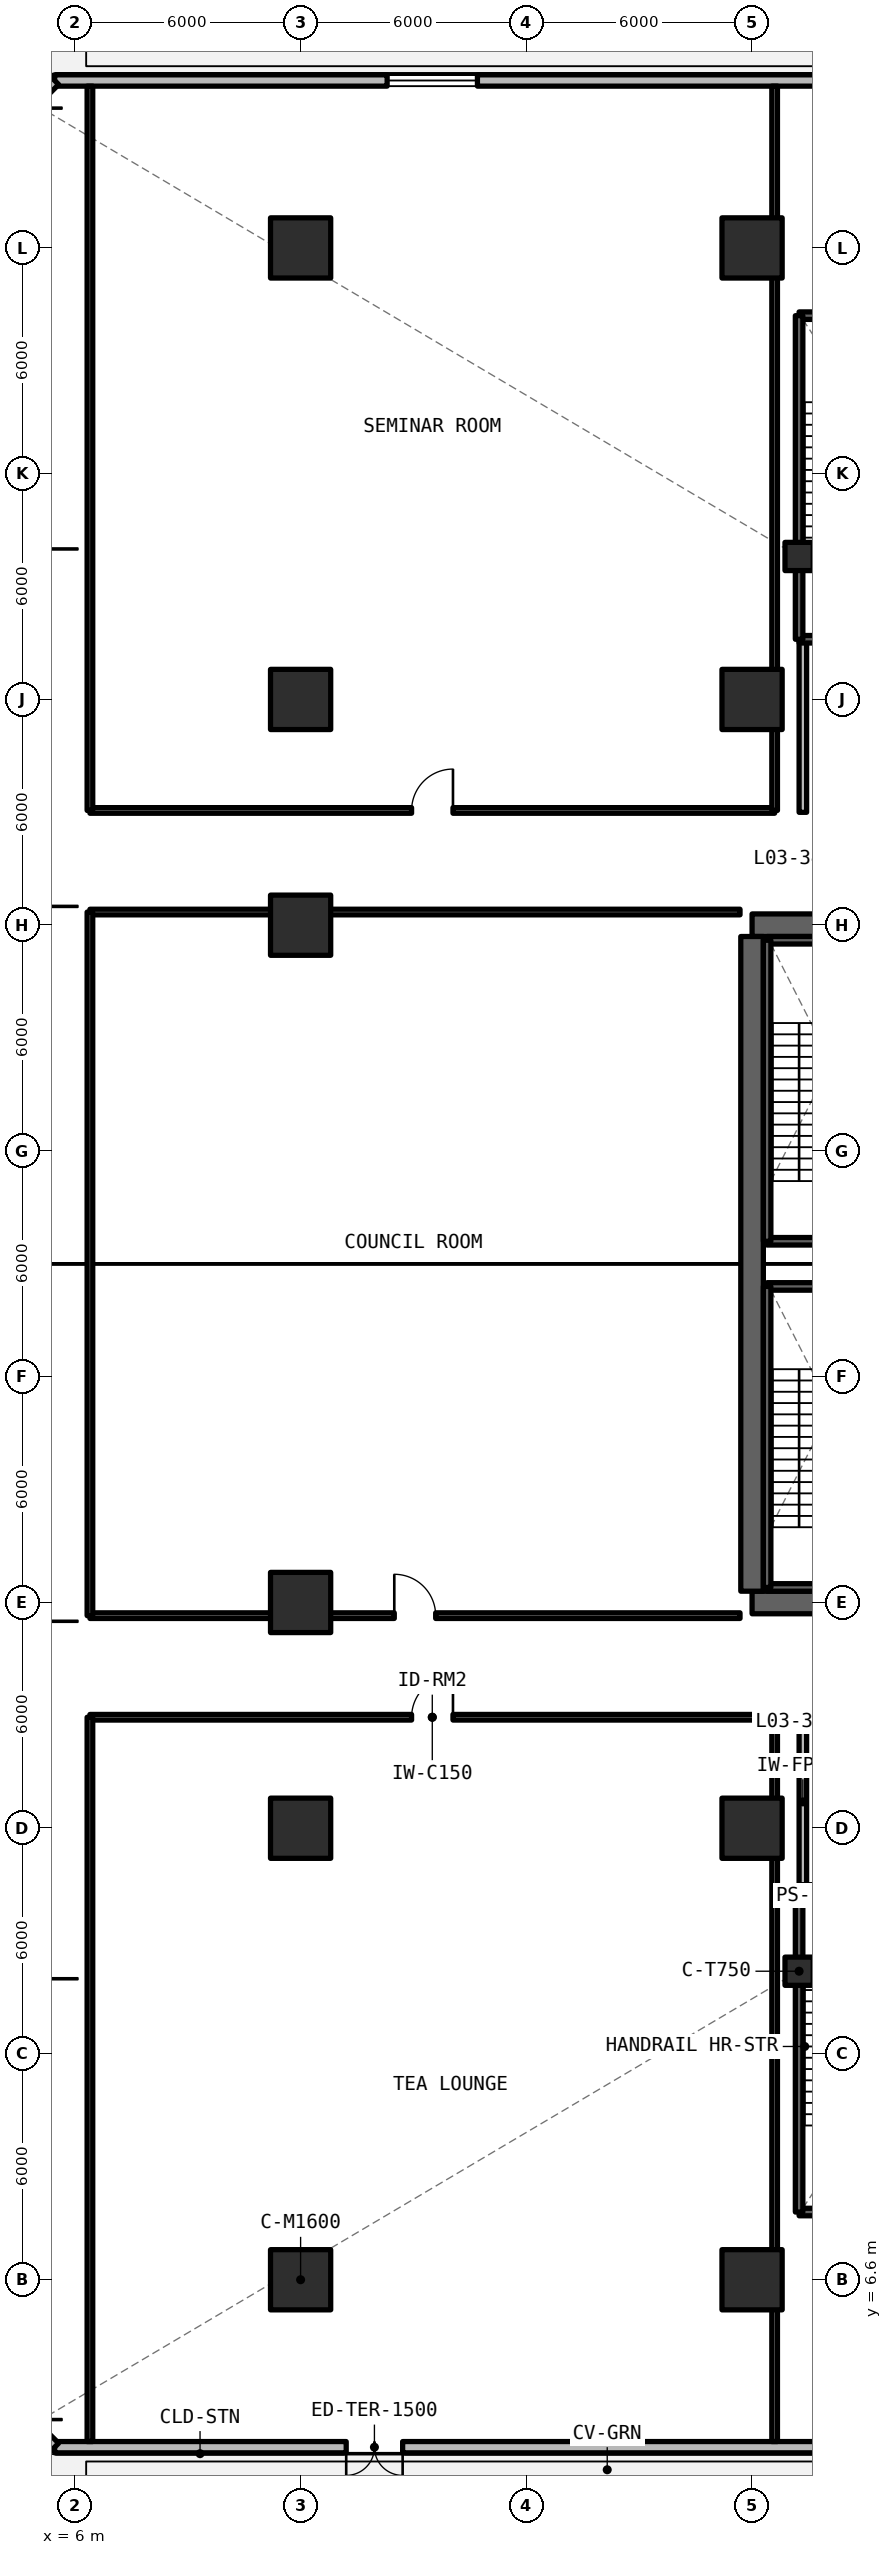
"""IFC4 building model, lengths in metres.
Left out: names, types, materials, properties, quantities, classifications, styles, units other than length and angle.
Written with IfcOpenShell. Run it as: python <this file> out.ifc"""

import sys

from ifc_helpers import new_model, si_unit, direction, frame, frame_2d, origin, origin_2d, place, context, subcontext, project, spatial, rectangle, extrude, element, fill, save


model = new_model("IFC4")
c1 = context("Model", 3, precision=1e-05, world=origin(), true_north=direction((0.0, 1.0)))
c2 = subcontext(c1, "Body", "Model", "MODEL_VIEW")
j1 = project(units=[si_unit("LENGTHUNIT", "METRE"), si_unit("PLANEANGLEUNIT", "RADIAN")], contexts=[c1])
p1 = place(None, origin())
s1 = spatial("IfcSite", under=j1, at=p1, CompositionType="ELEMENT")
p2 = place(p1, origin())
s2 = spatial("IfcBuilding", under=s1, at=p2, CompositionType="ELEMENT")
p3 = place(p2, frame((0.0, 0.0, 9.9)))
s3 = spatial("IfcBuildingStorey", under=s2, at=p3, CompositionType="ELEMENT", Elevation=9.9)
for number, where, z_axis, x_axis in (
    (1, (24.0, 24.6, 0.0), (0.0, 0.0, 1.0), (1.0, 0.0, 0.0)),
    (2, (36.0, 42.6, 0.0), (0.0, 0.0, 1.0), (-1.0, 0.0, 0.0)),
):
    element("IfcWall", number, at=place(p3, frame(where, z_axis=z_axis, x_axis=x_axis)), inside=s3, PredefinedType="SHEAR", context=c2, shape_type="SweptSolid", body=[
        extrude(rectangle(XDim=12.0, YDim=0.6, at=frame_2d((6.0, 0.0))), origin(), (0.0, 0.0, 1.0), 4.95),
    ])
p4 = place(p3, frame((24.0, 24.9, 0.0), z_axis=(0.0, 0.0, 1.0), x_axis=(0.0, 1.0, 0.0)))
e3 = element("IfcWall", 3, at=p4, inside=s3, PredefinedType="SHEAR", context=c2, shape_type="SweptSolid", body=[
    extrude(rectangle(XDim=17.4, YDim=0.6, at=frame_2d((8.7, 0.0))), origin(), (0.0, 0.0, 1.0), 4.95),
])
for number, where, z_axis, x_axis in (
    (4, (12.0, 6.6, 0.0), (0.0, 0.0, 1.0), (1.0, 0.0, 0.0)),
    (5, (12.0, 24.6, 0.0), (0.0, 0.0, 1.0), (1.0, 0.0, 0.0)),
    (6, (12.0, 42.6, 0.0), (0.0, 0.0, 1.0), (1.0, 0.0, 0.0)),
    (7, (12.0, 60.6, 0.0), (0.0, 0.0, 1.0), (1.0, 0.0, 0.0)),
    (8, (24.0, 6.6, 0.0), (0.0, 0.0, 1.0), (1.0, 0.0, 0.0)),
    (9, (24.0, 60.6, 0.0), (0.0, 0.0, 1.0), (1.0, 0.0, 0.0)),
    (10, (12.0, 18.6, 0.0), (0.0, 0.0, 1.0), (1.0, 0.0, 0.0)),
    (11, (12.0, 48.6, 0.0), (0.0, 0.0, 1.0), (1.0, 0.0, 0.0)),
    (12, (24.0, 18.6, 0.0), (0.0, 0.0, 1.0), (1.0, 0.0, 0.0)),
    (13, (24.0, 48.6, 0.0), (0.0, 0.0, 1.0), (1.0, 0.0, 0.0)),
):
    element("IfcColumn", number, at=place(p3, frame(where, z_axis=z_axis, x_axis=x_axis)), inside=s3, PredefinedType="COLUMN", context=c2, shape_type="SweptSolid", body=[
        extrude(rectangle(XDim=1.6, YDim=1.6, at=origin_2d()), origin(), (0.0, 0.0, 1.0), 4.95),
    ])
for number, where, z_axis, x_axis in (
    (14, (25.25, 14.8, 0.0), (0.0, 0.0, 1.0), (1.0, 0.0, 0.0)),
    (15, (25.25, 52.4, 0.0), (0.0, 0.0, 1.0), (1.0, 0.0, 0.0)),
):
    element("IfcColumn", number, at=place(p3, frame(where, z_axis=z_axis, x_axis=x_axis)), inside=s3, PredefinedType="COLUMN", context=c2, shape_type="SweptSolid", body=[
        extrude(rectangle(XDim=0.75, YDim=0.75, at=origin_2d()), origin(), (0.0, 0.0, 1.0), 4.95),
    ])
p5 = place(p3, frame((5.462, 2.15, 0.0), z_axis=(0.0, 0.0, 1.0), x_axis=(1.0, 0.0, 0.0)))
e16 = element("IfcWall", 16, at=p5, inside=s3, PredefinedType="SOLIDWALL", context=c2, shape_type="SweptSolid", body=[
    extrude(rectangle(XDim=44.338, YDim=0.3, at=frame_2d((22.169, 0.0))), origin(), (0.0, 0.0, 1.0), 4.67),
])
p6 = place(p5, frame((7.75, 0.0, 0.0)))
e17 = element("IfcOpeningElement", 17, at=p6, cuts=e16, PredefinedType="OPENING", context=c2, shape_type="SweptSolid", body=[
    extrude(rectangle(XDim=1.5, YDim=2.2, at=frame_2d((0.75, 1.1))), frame((0.0, 0.16, 0.0), z_axis=(0.0, -1.0, 0.0), x_axis=(1.0, 0.0, 0.0)), (0.0, 0.0, 1.0), 0.32),
])
p7 = place(p5, frame((29.988, 0.0, 0.78)))
e18 = element("IfcOpeningElement", 18, at=p7, cuts=e16, PredefinedType="OPENING", context=c2, shape_type="SweptSolid", body=[
    extrude(rectangle(XDim=2.4, YDim=1.66, at=frame_2d((1.2, 0.83))), frame((0.0, 0.16, 0.0), z_axis=(0.0, -1.0, 0.0), x_axis=(1.0, 0.0, 0.0)), (0.0, 0.0, 1.0), 0.32),
])
p8 = place(p5, frame((20.738, 0.0, 0.78)))
e19 = element("IfcOpeningElement", 19, at=p8, cuts=e16, PredefinedType="OPENING", context=c2, shape_type="SweptSolid", body=[
    extrude(rectangle(XDim=2.4, YDim=1.66, at=frame_2d((1.2, 0.83))), frame((0.0, 0.16, 0.0), z_axis=(0.0, -1.0, 0.0), x_axis=(1.0, 0.0, 0.0)), (0.0, 0.0, 1.0), 0.32),
])
p9 = place(p5, frame((25.719, 0.0, 0.78)))
e20 = element("IfcOpeningElement", 20, at=p9, cuts=e16, PredefinedType="OPENING", context=c2, shape_type="SweptSolid", body=[
    extrude(rectangle(XDim=2.4, YDim=1.66, at=frame_2d((1.2, 0.83))), frame((0.0, 0.16, 0.0), z_axis=(0.0, -1.0, 0.0), x_axis=(1.0, 0.0, 0.0)), (0.0, 0.0, 1.0), 0.32),
])
p10 = place(p5, frame((35.219, 0.0, 0.78)))
e21 = element("IfcOpeningElement", 21, at=p10, cuts=e16, PredefinedType="OPENING", context=c2, shape_type="SweptSolid", body=[
    extrude(rectangle(XDim=2.4, YDim=1.66, at=frame_2d((1.2, 0.83))), frame((0.0, 0.16, 0.0), z_axis=(0.0, -1.0, 0.0), x_axis=(1.0, 0.0, 0.0)), (0.0, 0.0, 1.0), 0.32),
])
p11 = place(p3, frame((49.8, 65.05, 0.0), z_axis=(0.0, 0.0, 1.0), x_axis=(-1.0, 0.0, 0.0)))
e22 = element("IfcWall", 22, at=p11, inside=s3, PredefinedType="SOLIDWALL", context=c2, shape_type="SweptSolid", body=[
    extrude(rectangle(XDim=44.338, YDim=0.3, at=frame_2d((22.169, 0.0))), origin(), (0.0, 0.0, 1.0), 4.67),
])
p12 = place(p11, frame((9.6, 0.0, 0.78)))
e23 = element("IfcOpeningElement", 23, at=p12, cuts=e22, PredefinedType="OPENING", context=c2, shape_type="SweptSolid", body=[
    extrude(rectangle(XDim=2.4, YDim=1.66, at=frame_2d((1.2, 0.83))), frame((0.0, 0.16, 0.0), z_axis=(0.0, -1.0, 0.0), x_axis=(1.0, 0.0, 0.0)), (0.0, 0.0, 1.0), 0.32),
])
p13 = place(p11, frame((0.635, 0.0, 0.78)))
e24 = element("IfcOpeningElement", 24, at=p13, cuts=e22, PredefinedType="OPENING", context=c2, shape_type="SweptSolid", body=[
    extrude(rectangle(XDim=0.85, YDim=1.65, at=frame_2d((0.425, 0.825))), frame((0.0, 0.16, 0.0), z_axis=(0.0, -1.0, 0.0), x_axis=(1.0, 0.0, 0.0)), (0.0, 0.0, 1.0), 0.32),
])
p14 = place(p11, frame((33.1, 0.0, 0.78)))
e25 = element("IfcOpeningElement", 25, at=p14, cuts=e22, PredefinedType="OPENING", context=c2, shape_type="SweptSolid", body=[
    extrude(rectangle(XDim=2.4, YDim=1.66, at=frame_2d((1.2, 0.83))), frame((0.0, 0.16, 0.0), z_axis=(0.0, -1.0, 0.0), x_axis=(1.0, 0.0, 0.0)), (0.0, 0.0, 1.0), 0.32),
])
p15 = place(p11, frame((21.2, 0.0, 0.78)))
e26 = element("IfcOpeningElement", 26, at=p15, cuts=e22, PredefinedType="OPENING", context=c2, shape_type="SweptSolid", body=[
    extrude(rectangle(XDim=2.4, YDim=1.66, at=frame_2d((1.2, 0.83))), frame((0.0, 0.16, 0.0), z_axis=(0.0, -1.0, 0.0), x_axis=(1.0, 0.0, 0.0)), (0.0, 0.0, 1.0), 0.32),
])
p16 = place(p11, frame((6.719, 0.0, 0.78)))
e27 = element("IfcOpeningElement", 27, at=p16, cuts=e22, PredefinedType="OPENING", context=c2, shape_type="SweptSolid", body=[
    extrude(rectangle(XDim=2.4, YDim=1.66, at=frame_2d((1.2, 0.83))), frame((0.0, 0.16, 0.0), z_axis=(0.0, -1.0, 0.0), x_axis=(1.0, 0.0, 0.0)), (0.0, 0.0, 1.0), 0.32),
])
p17 = place(p11, frame((16.219, 0.0, 0.78)))
e28 = element("IfcOpeningElement", 28, at=p17, cuts=e22, PredefinedType="OPENING", context=c2, shape_type="SweptSolid", body=[
    extrude(rectangle(XDim=2.4, YDim=1.66, at=frame_2d((1.2, 0.83))), frame((0.0, 0.16, 0.0), z_axis=(0.0, -1.0, 0.0), x_axis=(1.0, 0.0, 0.0)), (0.0, 0.0, 1.0), 0.32),
])
p18 = place(p3, frame((5.462, 65.05, 0.0), z_axis=(0.0, 0.0, 1.0), x_axis=(-0.707106781187, -0.707106781187, 0.0)))
e29 = element("IfcWall", 29, at=p18, inside=s3, PredefinedType="SOLIDWALL", context=c2, shape_type="SweptSolid", body=[
    extrude(rectangle(XDim=2.421, YDim=0.3, at=frame_2d((1.211, 0.0))), origin(), (0.0, 0.0, 1.0), 4.67),
])
p19 = place(p18, frame((0.786, 0.0, 0.78)))
e30 = element("IfcOpeningElement", 30, at=p19, cuts=e29, PredefinedType="OPENING", context=c2, shape_type="SweptSolid", body=[
    extrude(rectangle(XDim=0.85, YDim=1.65, at=frame_2d((0.425, 0.825))), frame((0.0, 0.16, 0.0), z_axis=(0.0, -1.0, 0.0), x_axis=(1.0, 0.0, 0.0)), (0.0, 0.0, 1.0), 0.32),
])
p20 = place(p3, frame((3.75, 3.862, 0.0), z_axis=(0.0, 0.0, 1.0), x_axis=(0.707106781187, -0.707106781187, 0.0)))
e31 = element("IfcWall", 31, at=p20, inside=s3, PredefinedType="SOLIDWALL", context=c2, shape_type="SweptSolid", body=[
    extrude(rectangle(XDim=2.421, YDim=0.3, at=frame_2d((1.211, 0.0))), origin(), (0.0, 0.0, 1.0), 4.67),
])
p21 = place(p20, frame((0.786, 0.0, 0.78)))
e32 = element("IfcOpeningElement", 32, at=p21, cuts=e31, PredefinedType="OPENING", context=c2, shape_type="SweptSolid", body=[
    extrude(rectangle(XDim=0.85, YDim=1.65, at=frame_2d((0.425, 0.825))), frame((0.0, 0.16, 0.0), z_axis=(0.0, -1.0, 0.0), x_axis=(1.0, 0.0, 0.0)), (0.0, 0.0, 1.0), 0.32),
])
p22 = place(p3, frame((25.35, 17.0, 0.0), z_axis=(0.0, 0.0, 1.0), x_axis=(0.0, 1.0, 0.0)))
e33 = element("IfcWall", 33, at=p22, inside=s3, PredefinedType="SOLIDWALL", context=c2, shape_type="SweptSolid", body=[
    extrude(rectangle(XDim=4.6, YDim=0.2, at=frame_2d((2.3, 0.0))), origin(), (0.0, 0.0, 1.0), 3.89),
])
p23 = place(p3, frame((25.35, 45.6, 0.0), z_axis=(0.0, 0.0, 1.0), x_axis=(0.0, 1.0, 0.0)))
e34 = element("IfcWall", 34, at=p23, inside=s3, PredefinedType="SOLIDWALL", context=c2, shape_type="SweptSolid", body=[
    extrude(rectangle(XDim=4.6, YDim=0.2, at=frame_2d((2.3, 0.0))), origin(), (0.0, 0.0, 1.0), 3.89),
])
p24 = place(p3, frame((6.4, 21.55, 0.0), z_axis=(0.0, 0.0, 1.0), x_axis=(1.0, 0.0, 0.0)))
e35 = element("IfcWall", 35, at=p24, inside=s3, PredefinedType="SOLIDWALL", context=c2, shape_type="SweptSolid", body=[
    extrude(rectangle(XDim=18.2, YDim=0.15, at=frame_2d((9.1, 0.0))), origin(), (0.0, 0.0, 1.0), 3.89),
])
p25 = place(p24, frame((8.55, 0.0, 0.0)))
e36 = element("IfcOpeningElement", 36, at=p25, cuts=e35, PredefinedType="OPENING", context=c2, shape_type="SweptSolid", body=[
    extrude(rectangle(XDim=1.1, YDim=2.15, at=frame_2d((0.55, 1.075))), frame((0.0, 0.085, 0.0), z_axis=(0.0, -1.0, 0.0), x_axis=(1.0, 0.0, 0.0)), (0.0, 0.0, 1.0), 0.17),
])
for number, where, z_axis, x_axis in (
    (37, (6.4, 2.3, 0.0), (0.0, 0.0, 1.0), (0.0, 1.0, 0.0)),
    (38, (24.6, 2.3, 0.0), (0.0, 0.0, 1.0), (0.0, 1.0, 0.0)),
):
    element("IfcWall", number, at=place(p3, frame(where, z_axis=z_axis, x_axis=x_axis)), inside=s3, PredefinedType="SOLIDWALL", context=c2, shape_type="SweptSolid", body=[
        extrude(rectangle(XDim=19.25, YDim=0.15, at=frame_2d((9.625, 0.0))), origin(), (0.0, 0.0, 1.0), 3.89),
    ])
p26 = place(p3, frame((6.4, 24.25, 0.0), z_axis=(0.0, 0.0, 1.0), x_axis=(1.0, 0.0, 0.0)))
e39 = element("IfcWall", 39, at=p26, inside=s3, PredefinedType="SOLIDWALL", context=c2, shape_type="SweptSolid", body=[
    extrude(rectangle(XDim=17.28, YDim=0.15, at=frame_2d((8.64, 0.0))), origin(), (0.0, 0.0, 1.0), 3.89),
])
p27 = place(p26, frame((8.09, 0.0, 0.0)))
e40 = element("IfcOpeningElement", 40, at=p27, cuts=e39, PredefinedType="OPENING", context=c2, shape_type="SweptSolid", body=[
    extrude(rectangle(XDim=1.1, YDim=2.15, at=frame_2d((0.55, 1.075))), frame((0.0, 0.085, 0.0), z_axis=(0.0, -1.0, 0.0), x_axis=(1.0, 0.0, 0.0)), (0.0, 0.0, 1.0), 0.17),
])
p28 = place(p3, frame((6.4, 42.95, 0.0), z_axis=(0.0, 0.0, 1.0), x_axis=(1.0, 0.0, 0.0)))
e41 = element("IfcWall", 41, at=p28, inside=s3, PredefinedType="SOLIDWALL", context=c2, shape_type="SweptSolid", body=[
    extrude(rectangle(XDim=17.28, YDim=0.15, at=frame_2d((8.64, 0.0))), origin(), (0.0, 0.0, 1.0), 3.89),
])
p29 = place(p3, frame((6.4, 24.25, 0.0), z_axis=(0.0, 0.0, 1.0), x_axis=(0.0, 1.0, 0.0)))
e42 = element("IfcWall", 42, at=p29, inside=s3, PredefinedType="SOLIDWALL", context=c2, shape_type="SweptSolid", body=[
    extrude(rectangle(XDim=18.7, YDim=0.15, at=frame_2d((9.35, 0.0))), origin(), (0.0, 0.0, 1.0), 3.89),
])
p30 = place(p3, frame((6.4, 45.65, 0.0), z_axis=(0.0, 0.0, 1.0), x_axis=(1.0, 0.0, 0.0)))
e43 = element("IfcWall", 43, at=p30, inside=s3, PredefinedType="SOLIDWALL", context=c2, shape_type="SweptSolid", body=[
    extrude(rectangle(XDim=18.2, YDim=0.15, at=frame_2d((9.1, 0.0))), origin(), (0.0, 0.0, 1.0), 3.89),
])
p31 = place(p30, frame((8.55, 0.0, 0.0)))
e44 = element("IfcOpeningElement", 44, at=p31, cuts=e43, PredefinedType="OPENING", context=c2, shape_type="SweptSolid", body=[
    extrude(rectangle(XDim=1.1, YDim=2.15, at=frame_2d((0.55, 1.075))), frame((0.0, 0.085, 0.0), z_axis=(0.0, -1.0, 0.0), x_axis=(1.0, 0.0, 0.0)), (0.0, 0.0, 1.0), 0.17),
])
for number, where, z_axis, x_axis in (
    (45, (6.4, 45.65, 0.0), (0.0, 0.0, 1.0), (0.0, 1.0, 0.0)),
    (46, (24.6, 45.65, 0.0), (0.0, 0.0, 1.0), (0.0, 1.0, 0.0)),
):
    element("IfcWall", number, at=place(p3, frame(where, z_axis=z_axis, x_axis=x_axis)), inside=s3, PredefinedType="SOLIDWALL", context=c2, shape_type="SweptSolid", body=[
        extrude(rectangle(XDim=19.25, YDim=0.15, at=frame_2d((9.625, 0.0))), origin(), (0.0, 0.0, 1.0), 3.89),
    ])
for number, where, z_axis, x_axis in (
    (47, (24.4, 25.0, 0.0), (0.0, 0.0, 1.0), (1.0, 0.0, 0.0)),
    (48, (27.8, 33.0, 0.0), (0.0, 0.0, 1.0), (-1.0, 0.0, 0.0)),
):
    element("IfcWall", number, at=place(p3, frame(where, z_axis=z_axis, x_axis=x_axis)), inside=s3, PredefinedType="SOLIDWALL", context=c2, shape_type="SweptSolid", body=[
        extrude(rectangle(XDim=3.4, YDim=0.2, at=frame_2d((1.7, 0.0))), origin(), (0.0, 0.0, 1.0), 4.95),
    ])
p32 = place(p3, frame((24.4, 33.0, 0.0), z_axis=(0.0, 0.0, 1.0), x_axis=(0.0, -1.0, 0.0)))
e49 = element("IfcWall", 49, at=p32, inside=s3, PredefinedType="SOLIDWALL", context=c2, shape_type="SweptSolid", body=[
    extrude(rectangle(XDim=8.0, YDim=0.2, at=frame_2d((4.0, 0.0))), origin(), (0.0, 0.0, 1.0), 4.95),
])
for number, where, z_axis, x_axis in (
    (50, (24.4, 34.2, 0.0), (0.0, 0.0, 1.0), (1.0, 0.0, 0.0)),
    (51, (27.8, 42.2, 0.0), (0.0, 0.0, 1.0), (-1.0, 0.0, 0.0)),
):
    element("IfcWall", number, at=place(p3, frame(where, z_axis=z_axis, x_axis=x_axis)), inside=s3, PredefinedType="SOLIDWALL", context=c2, shape_type="SweptSolid", body=[
        extrude(rectangle(XDim=3.4, YDim=0.2, at=frame_2d((1.7, 0.0))), origin(), (0.0, 0.0, 1.0), 4.95),
    ])
p33 = place(p3, frame((24.4, 42.2, 0.0), z_axis=(0.0, 0.0, 1.0), x_axis=(0.0, -1.0, 0.0)))
e52 = element("IfcWall", 52, at=p33, inside=s3, PredefinedType="SOLIDWALL", context=c2, shape_type="SweptSolid", body=[
    extrude(rectangle(XDim=8.0, YDim=0.2, at=frame_2d((4.0, 0.0))), origin(), (0.0, 0.0, 1.0), 4.95),
])
p34 = place(p3, frame((25.25, 8.4, 0.0), z_axis=(0.0, 0.0, 1.0), x_axis=(1.0, 0.0, 0.0)))
e53 = element("IfcWall", 53, at=p34, inside=s3, PredefinedType="SOLIDWALL", context=c2, shape_type="SweptSolid", body=[
    extrude(rectangle(XDim=4.4, YDim=0.2, at=frame_2d((2.2, 0.0))), origin(), (0.0, 0.0, 1.0), 4.95),
])
p35 = place(p3, frame((29.65, 17.0, 0.0), z_axis=(0.0, 0.0, 1.0), x_axis=(-1.0, 0.0, 0.0)))
e54 = element("IfcWall", 54, at=p35, inside=s3, PredefinedType="SOLIDWALL", context=c2, shape_type="SweptSolid", body=[
    extrude(rectangle(XDim=4.4, YDim=0.2, at=frame_2d((2.2, 0.0))), origin(), (0.0, 0.0, 1.0), 4.95),
])
p36 = place(p35, frame((1.625, 0.0, 0.0)))
e55 = element("IfcOpeningElement", 55, at=p36, cuts=e54, PredefinedType="OPENING", context=c2, shape_type="SweptSolid", body=[
    extrude(rectangle(XDim=1.15, YDim=2.15, at=frame_2d((0.575, 1.075))), frame((0.0, 0.11, 0.0), z_axis=(0.0, -1.0, 0.0), x_axis=(1.0, 0.0, 0.0)), (0.0, 0.0, 1.0), 0.22),
])
p37 = place(p3, frame((25.25, 17.0, 0.0), z_axis=(0.0, 0.0, 1.0), x_axis=(0.0, -1.0, 0.0)))
e56 = element("IfcWall", 56, at=p37, inside=s3, PredefinedType="SOLIDWALL", context=c2, shape_type="SweptSolid", body=[
    extrude(rectangle(XDim=8.6, YDim=0.2, at=frame_2d((4.3, 0.0))), origin(), (0.0, 0.0, 1.0), 4.95),
])
p38 = place(p3, frame((25.25, 50.2, 0.0), z_axis=(0.0, 0.0, 1.0), x_axis=(1.0, 0.0, 0.0)))
e57 = element("IfcWall", 57, at=p38, inside=s3, PredefinedType="SOLIDWALL", context=c2, shape_type="SweptSolid", body=[
    extrude(rectangle(XDim=4.4, YDim=0.2, at=frame_2d((2.2, 0.0))), origin(), (0.0, 0.0, 1.0), 4.95),
])
p39 = place(p38, frame((1.625, 0.0, 0.0)))
e58 = element("IfcOpeningElement", 58, at=p39, cuts=e57, PredefinedType="OPENING", context=c2, shape_type="SweptSolid", body=[
    extrude(rectangle(XDim=1.15, YDim=2.15, at=frame_2d((0.575, 1.075))), frame((0.0, 0.11, 0.0), z_axis=(0.0, -1.0, 0.0), x_axis=(1.0, 0.0, 0.0)), (0.0, 0.0, 1.0), 0.22),
])
p40 = place(p3, frame((29.65, 58.8, 0.0), z_axis=(0.0, 0.0, 1.0), x_axis=(-1.0, 0.0, 0.0)))
e59 = element("IfcWall", 59, at=p40, inside=s3, PredefinedType="SOLIDWALL", context=c2, shape_type="SweptSolid", body=[
    extrude(rectangle(XDim=4.4, YDim=0.2, at=frame_2d((2.2, 0.0))), origin(), (0.0, 0.0, 1.0), 4.95),
])
p41 = place(p3, frame((25.25, 58.8, 0.0), z_axis=(0.0, 0.0, 1.0), x_axis=(0.0, -1.0, 0.0)))
e60 = element("IfcWall", 60, at=p41, inside=s3, PredefinedType="SOLIDWALL", context=c2, shape_type="SweptSolid", body=[
    extrude(rectangle(XDim=8.6, YDim=0.2, at=frame_2d((4.3, 0.0))), origin(), (0.0, 0.0, 1.0), 4.95),
])
p42 = place(p6, frame((1.5, 0.0, 0.0), z_axis=(0.0, 0.0, 1.0), x_axis=(-1.0, 0.0, 0.0)))
e61 = element("IfcDoor", 61, at=p42, inside=s3, OperationType="SINGLE_SWING_RIGHT", PredefinedType="DOOR", context=c2, shape_type="SweptSolid", body=[
    extrude(rectangle(XDim=1.5, YDim=2.2, at=frame_2d((0.75, 1.1))), frame((0.0, 0.025, 0.0), z_axis=(0.0, -1.0, 0.0), x_axis=(1.0, 0.0, 0.0)), (0.0, 0.0, 1.0), 0.05),
])
fill(e17, e61)
p43 = place(p14, origin())
e62 = element("IfcWindow", 62, at=p43, inside=s3, PartitioningType="SINGLE_PANEL", PredefinedType="WINDOW", context=c2, shape_type="SweptSolid", body=[
    extrude(rectangle(XDim=2.4, YDim=1.66, at=frame_2d((1.2, 0.83))), frame((0.0, 0.03, 0.0), z_axis=(0.0, -1.0, 0.0), x_axis=(1.0, 0.0, 0.0)), (0.0, 0.0, 1.0), 0.06),
])
fill(e25, e62)
p44 = place(p25, origin())
e63 = element("IfcDoor", 63, at=p44, inside=s3, OperationType="SINGLE_SWING_RIGHT", PredefinedType="DOOR", context=c2, shape_type="SweptSolid", body=[
    extrude(rectangle(XDim=1.1, YDim=2.15, at=frame_2d((0.55, 1.075))), frame((0.0, 0.025, 0.0), z_axis=(0.0, -1.0, 0.0), x_axis=(1.0, 0.0, 0.0)), (0.0, 0.0, 1.0), 0.05),
])
fill(e36, e63)
p45 = place(p27, origin())
e64 = element("IfcDoor", 64, at=p45, inside=s3, OperationType="SINGLE_SWING_LEFT", PredefinedType="DOOR", context=c2, shape_type="SweptSolid", body=[
    extrude(rectangle(XDim=1.1, YDim=2.15, at=frame_2d((0.55, 1.075))), frame((0.0, 0.025, 0.0), z_axis=(0.0, -1.0, 0.0), x_axis=(1.0, 0.0, 0.0)), (0.0, 0.0, 1.0), 0.05),
])
fill(e40, e64)
p46 = place(p31, origin())
e65 = element("IfcDoor", 65, at=p46, inside=s3, OperationType="SINGLE_SWING_RIGHT", PredefinedType="DOOR", context=c2, shape_type="SweptSolid", body=[
    extrude(rectangle(XDim=1.1, YDim=2.15, at=frame_2d((0.55, 1.075))), frame((0.0, 0.025, 0.0), z_axis=(0.0, -1.0, 0.0), x_axis=(1.0, 0.0, 0.0)), (0.0, 0.0, 1.0), 0.05),
])
fill(e44, e65)
save(model, sys.argv[1])
